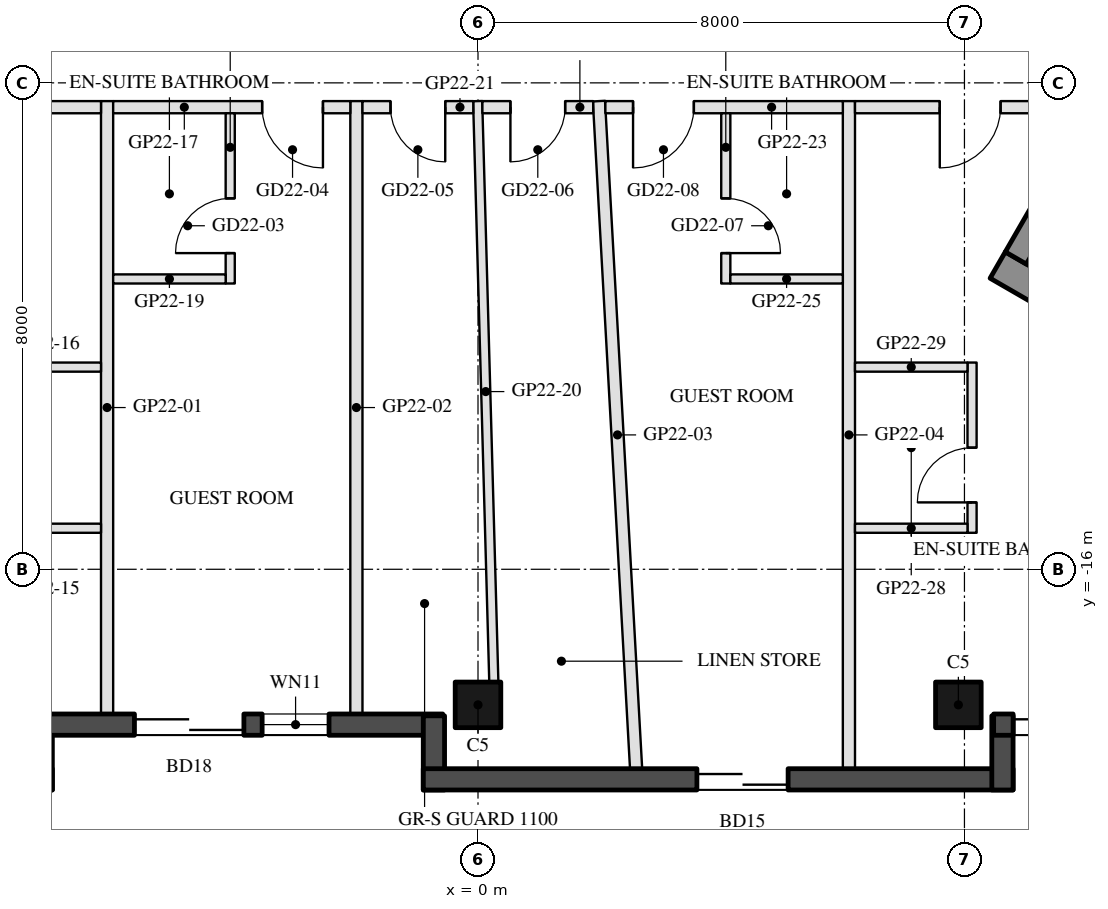
"""IFC4 building model, lengths in metres.
Left out: names, types, materials, properties, quantities, classifications, styles, units other than length and angle.
Written with IfcOpenShell. Run it as: python <this file> out.ifc"""

import sys

from ifc_helpers import new_model, si_unit, direction, frame, frame_2d, origin, origin_2d, place, context, subcontext, project, spatial, rectangle, hollow_rectangle, extrude, element, fill, save


model = new_model("IFC4")
c1 = context("Model", 3, precision=1e-05, world=origin(), true_north=direction((0.0, 1.0)))
c2 = subcontext(c1, "Body", "Model", "MODEL_VIEW")
j1 = project(units=[si_unit("LENGTHUNIT", "METRE"), si_unit("PLANEANGLEUNIT", "RADIAN")], contexts=[c1])
p1 = place(None, origin())
s1 = spatial("IfcSite", under=j1, at=p1, CompositionType="ELEMENT")
p2 = place(p1, origin())
s2 = spatial("IfcBuilding", under=s1, at=p2, CompositionType="ELEMENT")
p3 = place(p2, frame((0.0, 0.0, 224.3)))
s3 = spatial("IfcBuildingStorey", under=s2, at=p3, CompositionType="ELEMENT", Elevation=224.3)
for number, where, z_axis, x_axis in (
    (1, (0.0, -18.23, 0.0), (0.0, 0.0, 1.0), (-1.0, 0.0, 0.0)),
    (2, (7.9, -18.23, 0.0), (0.0, 0.0, 1.0), (-1.0, 0.0, 0.0)),
):
    element("IfcColumn", number, at=place(p3, frame(where, z_axis=z_axis, x_axis=x_axis)), inside=s3, PredefinedType="COLUMN", context=c2, shape_type="SweptSolid", body=[
        extrude(hollow_rectangle(XDim=0.75, YDim=0.75, WallThickness=0.035, at=origin_2d()), origin(), (0.0, 0.0, 1.0), 3.7),
    ])
p4 = place(p3, frame((-7.32, -18.555, 0.0), z_axis=(0.0, 0.0, 1.0), x_axis=(1.0, 0.0, 0.0)))
e3 = element("IfcWall", 3, at=p4, inside=s3, PredefinedType="SOLIDWALL", context=c2, shape_type="SweptSolid", body=[
    extrude(rectangle(XDim=6.74, YDim=0.35, at=frame_2d((3.37, 0.0))), origin(), (0.0, 0.0, 1.0), 3.55),
])
p5 = place(p4, frame((1.67, 0.0, 0.0)))
e4 = element("IfcOpeningElement", 4, at=p5, cuts=e3, PredefinedType="OPENING", context=c2, shape_type="SweptSolid", body=[
    extrude(rectangle(XDim=1.8, YDim=2.4, at=frame_2d((0.9, 1.2))), frame((0.0, 0.185, 0.0), z_axis=(0.0, -1.0, 0.0), x_axis=(1.0, 0.0, 0.0)), (0.0, 0.0, 1.0), 0.37),
])
p6 = place(p4, frame((3.77, 0.0, 0.3)))
e5 = element("IfcOpeningElement", 5, at=p6, cuts=e3, PredefinedType="OPENING", context=c2, shape_type="SweptSolid", body=[
    extrude(rectangle(XDim=1.1, YDim=2.65, at=frame_2d((0.55, 1.325))), frame((0.0, 0.185, 0.0), z_axis=(0.0, -1.0, 0.0), x_axis=(1.0, 0.0, 0.0)), (0.0, 0.0, 1.0), 0.37),
])
p7 = place(p3, frame((-0.725, -18.41, 0.0), z_axis=(0.0, 0.0, 1.0), x_axis=(0.0, -1.0, 0.0)))
e6 = element("IfcWall", 6, at=p7, inside=s3, PredefinedType="SOLIDWALL", context=c2, shape_type="SweptSolid", body=[
    extrude(rectangle(XDim=1.22, YDim=0.35, at=frame_2d((0.61, 0.0))), origin(), (0.0, 0.0, 1.0), 3.55),
])
p8 = place(p3, frame((-0.9, -19.455, 0.0), z_axis=(0.0, 0.0, 1.0), x_axis=(1.0, 0.0, 0.0)))
e7 = element("IfcWall", 7, at=p8, inside=s3, PredefinedType="SOLIDWALL", context=c2, shape_type="SweptSolid", body=[
    extrude(rectangle(XDim=9.7, YDim=0.35, at=frame_2d((4.85, 0.0))), origin(), (0.0, 0.0, 1.0), 3.55),
])
p9 = place(p8, frame((4.5, 0.0, 0.0)))
e8 = element("IfcOpeningElement", 8, at=p9, cuts=e7, PredefinedType="OPENING", context=c2, shape_type="SweptSolid", body=[
    extrude(rectangle(XDim=1.5, YDim=2.4, at=frame_2d((0.75, 1.2))), frame((0.0, 0.185, 0.0), z_axis=(0.0, -1.0, 0.0), x_axis=(1.0, 0.0, 0.0)), (0.0, 0.0, 1.0), 0.37),
])
p10 = place(p3, frame((8.625, -19.63, 0.0), z_axis=(0.0, 0.0, 1.0), x_axis=(0.0, 1.0, 0.0)))
e9 = element("IfcWall", 9, at=p10, inside=s3, PredefinedType="SOLIDWALL", context=c2, shape_type="SweptSolid", body=[
    extrude(rectangle(XDim=1.22, YDim=0.35, at=frame_2d((0.61, 0.0))), origin(), (0.0, 0.0, 1.0), 3.55),
])
p11 = place(p3, frame((8.48, -18.555, 0.0), z_axis=(0.0, 0.0, 1.0), x_axis=(1.0, 0.0, 0.0)))
e10 = element("IfcWall", 10, at=p11, inside=s3, PredefinedType="SOLIDWALL", context=c2, shape_type="SweptSolid", body=[
    extrude(rectangle(XDim=6.74, YDim=0.35, at=frame_2d((3.37, 0.0))), origin(), (0.0, 0.0, 1.0), 3.55),
])
p12 = place(p11, frame((0.32, 0.0, 0.0)))
e11 = element("IfcOpeningElement", 11, at=p12, cuts=e10, PredefinedType="OPENING", context=c2, shape_type="SweptSolid", body=[
    extrude(rectangle(XDim=2.4, YDim=2.4, at=frame_2d((1.2, 1.2))), frame((0.0, 0.185, 0.0), z_axis=(0.0, -1.0, 0.0), x_axis=(1.0, 0.0, 0.0)), (0.0, 0.0, 1.0), 0.37),
])
p13 = place(p11, frame((3.02, 0.0, 0.3)))
e12 = element("IfcOpeningElement", 12, at=p13, cuts=e10, PredefinedType="OPENING", context=c2, shape_type="SweptSolid", body=[
    extrude(rectangle(XDim=2.9, YDim=2.65, at=frame_2d((1.45, 1.325))), frame((0.0, 0.185, 0.0), z_axis=(0.0, -1.0, 0.0), x_axis=(1.0, 0.0, 0.0)), (0.0, 0.0, 1.0), 0.37),
])
p14 = place(p3, frame((8.547, -10.997, 0.0), z_axis=(0.0, 0.0, 1.0), x_axis=(0.866025009528, -0.500000682871, 0.0)))
e13 = element("IfcWall", 13, at=p14, inside=s3, PredefinedType="SHEAR", context=c2, shape_type="SweptSolid", body=[
    extrude(rectangle(XDim=14.837, YDim=0.5, at=frame_2d((7.418, 0.0))), origin(), (0.0, 0.0, 1.0), 3.5),
])
p15 = place(p3, frame((8.845, -10.88, 0.0), z_axis=(0.0, 0.0, 1.0), x_axis=(0.500004234368, 0.866022959057, 0.0)))
e14 = element("IfcWall", 14, at=p15, inside=s3, PredefinedType="SHEAR", context=c2, shape_type="SweptSolid", body=[
    extrude(rectangle(XDim=10.0, YDim=0.4, at=frame_2d((5.0, 0.0))), origin(), (0.0, 0.0, 1.0), 3.5),
])
p16 = place(p15, frame((3.55, 0.0, 0.0)))
e15 = element("IfcOpeningElement", 15, at=p16, cuts=e14, PredefinedType="OPENING", context=c2, shape_type="SweptSolid", body=[
    extrude(rectangle(XDim=1.1, YDim=2.1, at=frame_2d((0.55, 1.05))), frame((0.0, 0.21, 0.0), z_axis=(0.0, -1.0, 0.0), x_axis=(1.0, 0.0, 0.0)), (0.0, 0.0, 1.0), 0.42),
])
p17 = place(p15, frame((5.85, 0.0, 0.0)))
e16 = element("IfcOpeningElement", 16, at=p17, cuts=e14, PredefinedType="OPENING", context=c2, shape_type="SweptSolid", body=[
    extrude(rectangle(XDim=1.4, YDim=2.1, at=frame_2d((0.7, 1.05))), frame((0.0, 0.21, 0.0), z_axis=(0.0, -1.0, 0.0), x_axis=(1.0, 0.0, 0.0)), (0.0, 0.0, 1.0), 0.42),
])
for number, where, z_axis, x_axis in (
    (17, (-6.1, -18.38, 0.0), (0.0, 0.0, 1.0), (0.0, 1.0, 0.0)),
    (18, (-2.0, -18.38, 0.0), (0.0, 0.0, 1.0), (0.0, 1.0, 0.0)),
):
    element("IfcWall", number, at=place(p3, frame(where, z_axis=z_axis, x_axis=x_axis)), inside=s3, PredefinedType="PARTITIONING", context=c2, shape_type="SweptSolid", body=[
        extrude(rectangle(XDim=10.08, YDim=0.2, at=frame_2d((5.04, 0.0))), origin(), (0.0, 0.0, 1.0), 3.06),
    ])
p18 = place(p3, frame((2.6, -19.28, 0.0), z_axis=(0.0, 0.0, 1.0), x_axis=(-0.055568385591, 0.998454883569, 0.0)))
e19 = element("IfcWall", 19, at=p18, inside=s3, PredefinedType="PARTITIONING", context=c2, shape_type="SweptSolid", body=[
    extrude(rectangle(XDim=10.997, YDim=0.2, at=frame_2d((5.499, 0.0))), origin(), (0.0, 0.0, 1.0), 3.06),
])
p19 = place(p3, frame((6.1, -19.28, 0.0), z_axis=(0.0, 0.0, 1.0), x_axis=(0.0, 1.0, 0.0)))
e20 = element("IfcWall", 20, at=p19, inside=s3, PredefinedType="PARTITIONING", context=c2, shape_type="SweptSolid", body=[
    extrude(rectangle(XDim=10.98, YDim=0.2, at=frame_2d((5.49, 0.0))), origin(), (0.0, 0.0, 1.0), 3.06),
])
p20 = place(p3, frame((-6.2, -8.4, 0.0), z_axis=(0.0, 0.0, 1.0), x_axis=(-1.0, 0.0, 0.0)))
e21 = element("IfcWall", 21, at=p20, inside=s3, PredefinedType="PARTITIONING", context=c2, shape_type="SweptSolid", body=[
    extrude(rectangle(XDim=3.788, YDim=0.2, at=frame_2d((1.894, 0.0))), origin(), (0.0, 0.0, 1.0), 2.95),
])
p21 = place(p20, frame((1.394, 0.0, 0.0)))
e22 = element("IfcOpeningElement", 22, at=p21, cuts=e21, PredefinedType="OPENING", context=c2, shape_type="SweptSolid", body=[
    extrude(rectangle(XDim=1.0, YDim=2.1, at=frame_2d((0.5, 1.05))), frame((0.0, 0.11, 0.0), z_axis=(0.0, -1.0, 0.0), x_axis=(1.0, 0.0, 0.0)), (0.0, 0.0, 1.0), 0.22),
])
for number, where, z_axis, x_axis in (
    (23, (-8.05, -15.325, 0.0), (0.0, 0.0, 1.0), (1.0, 0.0, 0.0)),
    (24, (-8.05, -12.675, 0.0), (0.0, 0.0, 1.0), (1.0, 0.0, 0.0)),
):
    element("IfcWall", number, at=place(p3, frame(where, z_axis=z_axis, x_axis=x_axis)), inside=s3, PredefinedType="PARTITIONING", context=c2, shape_type="SweptSolid", body=[
        extrude(rectangle(XDim=1.85, YDim=0.15, at=frame_2d((0.925, 0.0))), origin(), (0.0, 0.0, 1.0), 2.95),
    ])
p22 = place(p3, frame((-2.1, -8.4, 0.0), z_axis=(0.0, 0.0, 1.0), x_axis=(-1.0, 0.0, 0.0)))
e25 = element("IfcWall", 25, at=p22, inside=s3, PredefinedType="PARTITIONING", context=c2, shape_type="SweptSolid", body=[
    extrude(rectangle(XDim=3.9, YDim=0.2, at=frame_2d((1.95, 0.0))), origin(), (0.0, 0.0, 1.0), 2.95),
])
p23 = place(p22, frame((0.45, 0.0, 0.0)))
e26 = element("IfcOpeningElement", 26, at=p23, cuts=e25, PredefinedType="OPENING", context=c2, shape_type="SweptSolid", body=[
    extrude(rectangle(XDim=1.0, YDim=2.1, at=frame_2d((0.5, 1.05))), frame((0.0, 0.11, 0.0), z_axis=(0.0, -1.0, 0.0), x_axis=(1.0, 0.0, 0.0)), (0.0, 0.0, 1.0), 0.22),
])
p24 = place(p3, frame((-4.075, -11.3, 0.0), z_axis=(0.0, 0.0, 1.0), x_axis=(0.0, 1.0, 0.0)))
e27 = element("IfcWall", 27, at=p24, inside=s3, PredefinedType="PARTITIONING", context=c2, shape_type="SweptSolid", body=[
    extrude(rectangle(XDim=2.8, YDim=0.15, at=frame_2d((1.4, 0.0))), origin(), (0.0, 0.0, 1.0), 2.95),
])
p25 = place(p24, frame((0.5, 0.0, 0.0)))
e28 = element("IfcOpeningElement", 28, at=p25, cuts=e27, PredefinedType="OPENING", context=c2, shape_type="SweptSolid", body=[
    extrude(rectangle(XDim=0.9, YDim=2.1, at=frame_2d((0.45, 1.05))), frame((0.0, 0.085, 0.0), z_axis=(0.0, -1.0, 0.0), x_axis=(1.0, 0.0, 0.0)), (0.0, 0.0, 1.0), 0.17),
])
p26 = place(p3, frame((-6.0, -11.225, 0.0), z_axis=(0.0, 0.0, 1.0), x_axis=(1.0, 0.0, 0.0)))
e29 = element("IfcWall", 29, at=p26, inside=s3, PredefinedType="PARTITIONING", context=c2, shape_type="SweptSolid", body=[
    extrude(rectangle(XDim=1.85, YDim=0.15, at=frame_2d((0.925, 0.0))), origin(), (0.0, 0.0, 1.0), 3.55),
])
p27 = place(p3, frame((0.26, -17.855, 0.0), z_axis=(0.0, 0.0, 1.0), x_axis=(-0.02781456591, 0.999613100116, 0.0)))
e30 = element("IfcWall", 30, at=p27, inside=s3, PredefinedType="PARTITIONING", context=c2, shape_type="SweptSolid", body=[
    extrude(rectangle(XDim=9.559, YDim=0.15, at=frame_2d((4.779, 0.0))), origin(), (0.0, 0.0, 1.0), 2.95),
])
p28 = place(p3, frame((-0.078, -8.4, 0.0), z_axis=(0.0, 0.0, 1.0), x_axis=(-1.0, 0.0, 0.0)))
e31 = element("IfcWall", 31, at=p28, inside=s3, PredefinedType="PARTITIONING", context=c2, shape_type="SweptSolid", body=[
    extrude(rectangle(XDim=1.822, YDim=0.2, at=frame_2d((0.911, 0.0))), origin(), (0.0, 0.0, 1.0), 2.95),
])
p29 = place(p28, frame((0.461, 0.0, 0.0)))
e32 = element("IfcOpeningElement", 32, at=p29, cuts=e31, PredefinedType="OPENING", context=c2, shape_type="SweptSolid", body=[
    extrude(rectangle(XDim=0.9, YDim=2.1, at=frame_2d((0.45, 1.05))), frame((0.0, 0.11, 0.0), z_axis=(0.0, -1.0, 0.0), x_axis=(1.0, 0.0, 0.0)), (0.0, 0.0, 1.0), 0.22),
])
p30 = place(p3, frame((1.894, -8.4, 0.0), z_axis=(0.0, 0.0, 1.0), x_axis=(-1.0, 0.0, 0.0)))
e33 = element("IfcWall", 33, at=p30, inside=s3, PredefinedType="PARTITIONING", context=c2, shape_type="SweptSolid", body=[
    extrude(rectangle(XDim=1.822, YDim=0.2, at=frame_2d((0.911, 0.0))), origin(), (0.0, 0.0, 1.0), 2.95),
])
p31 = place(p30, frame((0.461, 0.0, 0.0)))
e34 = element("IfcOpeningElement", 34, at=p31, cuts=e33, PredefinedType="OPENING", context=c2, shape_type="SweptSolid", body=[
    extrude(rectangle(XDim=0.9, YDim=2.1, at=frame_2d((0.45, 1.05))), frame((0.0, 0.11, 0.0), z_axis=(0.0, -1.0, 0.0), x_axis=(1.0, 0.0, 0.0)), (0.0, 0.0, 1.0), 0.22),
])
p32 = place(p3, frame((6.0, -8.4, 0.0), z_axis=(0.0, 0.0, 1.0), x_axis=(-1.0, 0.0, 0.0)))
e35 = element("IfcWall", 35, at=p32, inside=s3, PredefinedType="PARTITIONING", context=c2, shape_type="SweptSolid", body=[
    extrude(rectangle(XDim=3.906, YDim=0.2, at=frame_2d((1.953, 0.0))), origin(), (0.0, 0.0, 1.0), 2.95),
])
p33 = place(p32, frame((2.45, 0.0, 0.0)))
e36 = element("IfcOpeningElement", 36, at=p33, cuts=e35, PredefinedType="OPENING", context=c2, shape_type="SweptSolid", body=[
    extrude(rectangle(XDim=1.0, YDim=2.1, at=frame_2d((0.5, 1.05))), frame((0.0, 0.11, 0.0), z_axis=(0.0, -1.0, 0.0), x_axis=(1.0, 0.0, 0.0)), (0.0, 0.0, 1.0), 0.22),
])
p34 = place(p3, frame((4.075, -8.5, 0.0), z_axis=(0.0, 0.0, 1.0), x_axis=(0.0, -1.0, 0.0)))
e37 = element("IfcWall", 37, at=p34, inside=s3, PredefinedType="PARTITIONING", context=c2, shape_type="SweptSolid", body=[
    extrude(rectangle(XDim=2.8, YDim=0.15, at=frame_2d((1.4, 0.0))), origin(), (0.0, 0.0, 1.0), 2.95),
])
p35 = place(p34, frame((1.4, 0.0, 0.0)))
e38 = element("IfcOpeningElement", 38, at=p35, cuts=e37, PredefinedType="OPENING", context=c2, shape_type="SweptSolid", body=[
    extrude(rectangle(XDim=0.9, YDim=2.1, at=frame_2d((0.45, 1.05))), frame((0.0, 0.085, 0.0), z_axis=(0.0, -1.0, 0.0), x_axis=(1.0, 0.0, 0.0)), (0.0, 0.0, 1.0), 0.17),
])
p36 = place(p3, frame((4.15, -11.225, 0.0), z_axis=(0.0, 0.0, 1.0), x_axis=(1.0, 0.0, 0.0)))
e39 = element("IfcWall", 39, at=p36, inside=s3, PredefinedType="PARTITIONING", context=c2, shape_type="SweptSolid", body=[
    extrude(rectangle(XDim=1.85, YDim=0.15, at=frame_2d((0.925, 0.0))), origin(), (0.0, 0.0, 1.0), 3.55),
])
p37 = place(p3, frame((9.988, -8.4, 0.0), z_axis=(0.0, 0.0, 1.0), x_axis=(-1.0, 0.0, 0.0)))
e40 = element("IfcWall", 40, at=p37, inside=s3, PredefinedType="PARTITIONING", context=c2, shape_type="SweptSolid", body=[
    extrude(rectangle(XDim=3.788, YDim=0.2, at=frame_2d((1.894, 0.0))), origin(), (0.0, 0.0, 1.0), 2.95),
])
p38 = place(p37, frame((1.394, 0.0, 0.0)))
e41 = element("IfcOpeningElement", 41, at=p38, cuts=e40, PredefinedType="OPENING", context=c2, shape_type="SweptSolid", body=[
    extrude(rectangle(XDim=1.0, YDim=2.1, at=frame_2d((0.5, 1.05))), frame((0.0, 0.11, 0.0), z_axis=(0.0, -1.0, 0.0), x_axis=(1.0, 0.0, 0.0)), (0.0, 0.0, 1.0), 0.22),
])
p39 = place(p3, frame((8.125, -15.4, 0.0), z_axis=(0.0, 0.0, 1.0), x_axis=(0.0, 1.0, 0.0)))
e42 = element("IfcWall", 42, at=p39, inside=s3, PredefinedType="PARTITIONING", context=c2, shape_type="SweptSolid", body=[
    extrude(rectangle(XDim=2.8, YDim=0.15, at=frame_2d((1.4, 0.0))), origin(), (0.0, 0.0, 1.0), 3.55),
])
p40 = place(p39, frame((0.5, 0.0, 0.0)))
e43 = element("IfcOpeningElement", 43, at=p40, cuts=e42, PredefinedType="OPENING", context=c2, shape_type="SweptSolid", body=[
    extrude(rectangle(XDim=0.9, YDim=2.1, at=frame_2d((0.45, 1.05))), frame((0.0, 0.085, 0.0), z_axis=(0.0, -1.0, 0.0), x_axis=(1.0, 0.0, 0.0)), (0.0, 0.0, 1.0), 0.17),
])
for number, where, z_axis, x_axis in (
    (44, (6.2, -15.325, 0.0), (0.0, 0.0, 1.0), (1.0, 0.0, 0.0)),
    (45, (6.2, -12.675, 0.0), (0.0, 0.0, 1.0), (1.0, 0.0, 0.0)),
):
    element("IfcWall", number, at=place(p3, frame(where, z_axis=z_axis, x_axis=x_axis)), inside=s3, PredefinedType="PARTITIONING", context=c2, shape_type="SweptSolid", body=[
        extrude(rectangle(XDim=1.85, YDim=0.15, at=frame_2d((0.925, 0.0))), origin(), (0.0, 0.0, 1.0), 2.95),
    ])
p41 = place(p5, frame((1.8, 0.0, 0.0), z_axis=(0.0, 0.0, 1.0), x_axis=(-1.0, 0.0, 0.0)))
e46 = element("IfcDoor", 46, at=p41, inside=s3, OperationType="SLIDING_TO_LEFT", PredefinedType="DOOR", context=c2, shape_type="SweptSolid", body=[
    extrude(rectangle(XDim=1.8, YDim=2.4, at=frame_2d((0.9, 1.2))), frame((0.0, 0.025, 0.0), z_axis=(0.0, -1.0, 0.0), x_axis=(1.0, 0.0, 0.0)), (0.0, 0.0, 1.0), 0.05),
])
fill(e4, e46)
p42 = place(p6, origin())
e47 = element("IfcWindow", 47, at=p42, inside=s3, PartitioningType="SINGLE_PANEL", PredefinedType="WINDOW", context=c2, shape_type="SweptSolid", body=[
    extrude(rectangle(XDim=1.1, YDim=2.65, at=frame_2d((0.55, 1.325))), frame((0.0, 0.03, 0.0), z_axis=(0.0, -1.0, 0.0), x_axis=(1.0, 0.0, 0.0)), (0.0, 0.0, 1.0), 0.06),
])
fill(e5, e47)
p43 = place(p9, frame((1.5, 0.0, 0.0), z_axis=(0.0, 0.0, 1.0), x_axis=(-1.0, 0.0, 0.0)))
e48 = element("IfcDoor", 48, at=p43, inside=s3, OperationType="SLIDING_TO_LEFT", PredefinedType="DOOR", context=c2, shape_type="SweptSolid", body=[
    extrude(rectangle(XDim=1.5, YDim=2.4, at=frame_2d((0.75, 1.2))), frame((0.0, 0.025, 0.0), z_axis=(0.0, -1.0, 0.0), x_axis=(1.0, 0.0, 0.0)), (0.0, 0.0, 1.0), 0.05),
])
fill(e8, e48)
p44 = place(p12, frame((2.4, 0.0, 0.0), z_axis=(0.0, 0.0, 1.0), x_axis=(-1.0, 0.0, 0.0)))
e49 = element("IfcDoor", 49, at=p44, inside=s3, OperationType="SLIDING_TO_LEFT", PredefinedType="DOOR", context=c2, shape_type="SweptSolid", body=[
    extrude(rectangle(XDim=2.4, YDim=2.4, at=frame_2d((1.2, 1.2))), frame((0.0, 0.025, 0.0), z_axis=(0.0, -1.0, 0.0), x_axis=(1.0, 0.0, 0.0)), (0.0, 0.0, 1.0), 0.05),
])
fill(e11, e49)
p45 = place(p25, origin())
e50 = element("IfcDoor", 50, at=p45, inside=s3, OperationType="SINGLE_SWING_LEFT", PredefinedType="DOOR", context=c2, shape_type="SweptSolid", body=[
    extrude(rectangle(XDim=0.9, YDim=2.1, at=frame_2d((0.45, 1.05))), frame((0.0, 0.025, 0.0), z_axis=(0.0, -1.0, 0.0), x_axis=(1.0, 0.0, 0.0)), (0.0, 0.0, 1.0), 0.05),
])
fill(e28, e50)
p46 = place(p23, origin())
e51 = element("IfcDoor", 51, at=p46, inside=s3, OperationType="SINGLE_SWING_LEFT", PredefinedType="DOOR", context=c2, shape_type="SweptSolid", body=[
    extrude(rectangle(XDim=1.0, YDim=2.1, at=frame_2d((0.5, 1.05))), frame((0.0, 0.025, 0.0), z_axis=(0.0, -1.0, 0.0), x_axis=(1.0, 0.0, 0.0)), (0.0, 0.0, 1.0), 0.05),
])
fill(e26, e51)
p47 = place(p29, origin())
e52 = element("IfcDoor", 52, at=p47, inside=s3, OperationType="SINGLE_SWING_LEFT", PredefinedType="DOOR", context=c2, shape_type="SweptSolid", body=[
    extrude(rectangle(XDim=0.9, YDim=2.1, at=frame_2d((0.45, 1.05))), frame((0.0, 0.025, 0.0), z_axis=(0.0, -1.0, 0.0), x_axis=(1.0, 0.0, 0.0)), (0.0, 0.0, 1.0), 0.05),
])
fill(e32, e52)
p48 = place(p31, origin())
e53 = element("IfcDoor", 53, at=p48, inside=s3, OperationType="SINGLE_SWING_RIGHT", PredefinedType="DOOR", context=c2, shape_type="SweptSolid", body=[
    extrude(rectangle(XDim=0.9, YDim=2.1, at=frame_2d((0.45, 1.05))), frame((0.0, 0.025, 0.0), z_axis=(0.0, -1.0, 0.0), x_axis=(1.0, 0.0, 0.0)), (0.0, 0.0, 1.0), 0.05),
])
fill(e34, e53)
p49 = place(p35, origin())
e54 = element("IfcDoor", 54, at=p49, inside=s3, OperationType="SINGLE_SWING_RIGHT", PredefinedType="DOOR", context=c2, shape_type="SweptSolid", body=[
    extrude(rectangle(XDim=0.9, YDim=2.1, at=frame_2d((0.45, 1.05))), frame((0.0, 0.025, 0.0), z_axis=(0.0, -1.0, 0.0), x_axis=(1.0, 0.0, 0.0)), (0.0, 0.0, 1.0), 0.05),
])
fill(e38, e54)
p50 = place(p33, origin())
e55 = element("IfcDoor", 55, at=p50, inside=s3, OperationType="SINGLE_SWING_RIGHT", PredefinedType="DOOR", context=c2, shape_type="SweptSolid", body=[
    extrude(rectangle(XDim=1.0, YDim=2.1, at=frame_2d((0.5, 1.05))), frame((0.0, 0.025, 0.0), z_axis=(0.0, -1.0, 0.0), x_axis=(1.0, 0.0, 0.0)), (0.0, 0.0, 1.0), 0.05),
])
fill(e36, e55)
p51 = place(p40, origin())
e56 = element("IfcDoor", 56, at=p51, inside=s3, OperationType="SINGLE_SWING_LEFT", PredefinedType="DOOR", context=c2, shape_type="SweptSolid", body=[
    extrude(rectangle(XDim=0.9, YDim=2.1, at=frame_2d((0.45, 1.05))), frame((0.0, 0.025, 0.0), z_axis=(0.0, -1.0, 0.0), x_axis=(1.0, 0.0, 0.0)), (0.0, 0.0, 1.0), 0.05),
])
fill(e43, e56)
p52 = place(p38, origin())
e57 = element("IfcDoor", 57, at=p52, inside=s3, OperationType="SINGLE_SWING_RIGHT", PredefinedType="DOOR", context=c2, shape_type="SweptSolid", body=[
    extrude(rectangle(XDim=1.0, YDim=2.1, at=frame_2d((0.5, 1.05))), frame((0.0, 0.025, 0.0), z_axis=(0.0, -1.0, 0.0), x_axis=(1.0, 0.0, 0.0)), (0.0, 0.0, 1.0), 0.05),
])
fill(e41, e57)
save(model, sys.argv[1])
